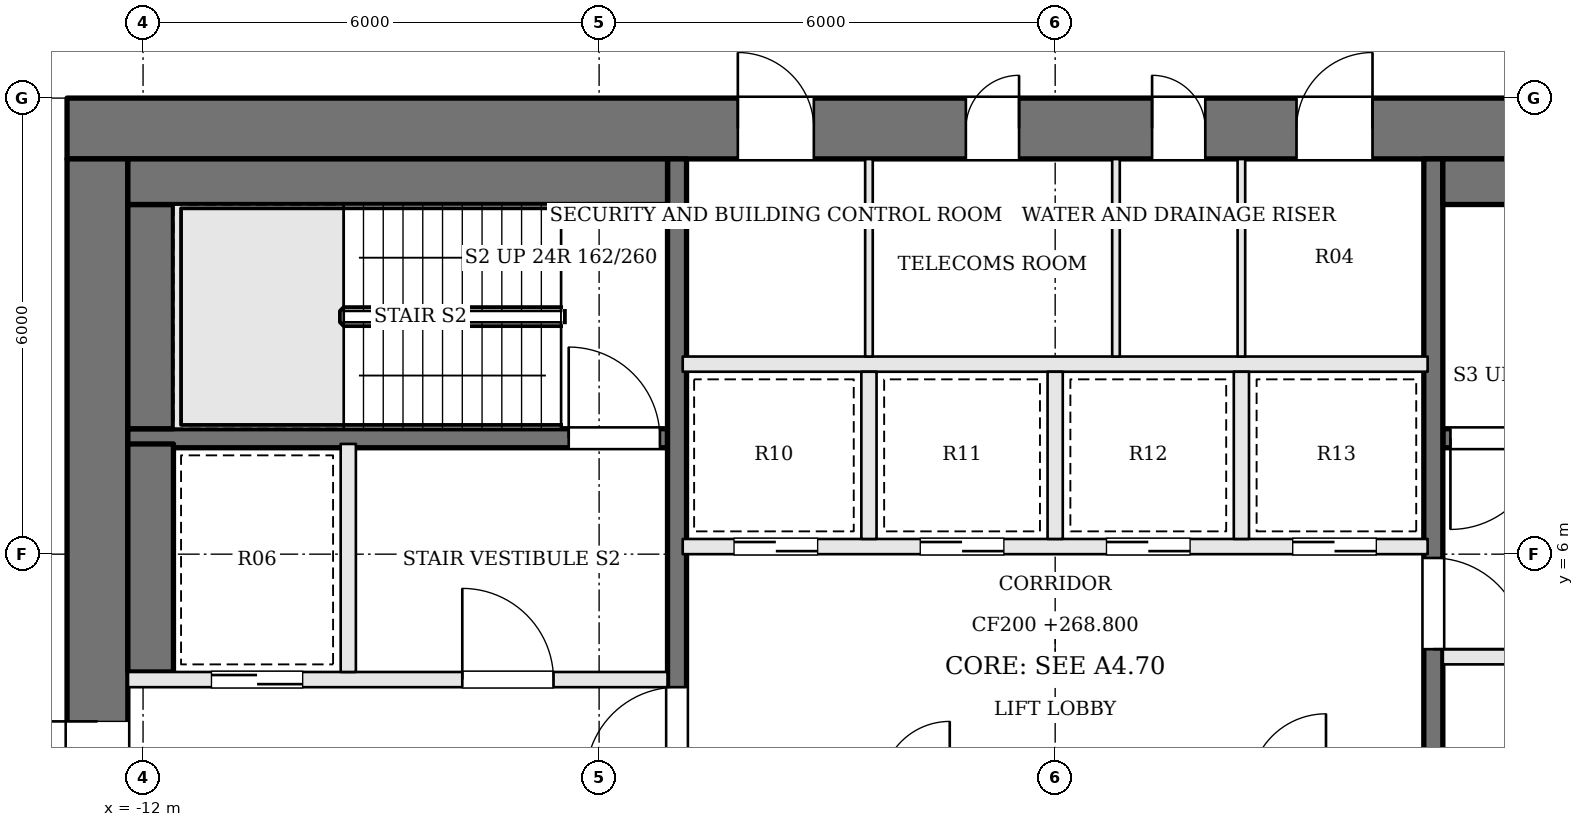
"""IFC4 building model, lengths in metres.
Left out: names, types, materials, properties, quantities, classifications, styles, units other than length and angle.
Written with IfcOpenShell. Run it as: python <this file> out.ifc"""

import sys

from ifc_helpers import new_model, si_unit, direction, frame, frame_2d, origin, place, context, subcontext, project, spatial, rectangle, extrude, element, fill, save


model = new_model("IFC4")
c1 = context("Model", 3, precision=1e-05, world=origin(), true_north=direction((0.0, 1.0)))
c2 = subcontext(c1, "Body", "Model", "MODEL_VIEW")
j1 = project(units=[si_unit("LENGTHUNIT", "METRE"), si_unit("PLANEANGLEUNIT", "RADIAN")], contexts=[c1])
p1 = place(None, origin())
s1 = spatial("IfcSite", under=j1, at=p1, CompositionType="ELEMENT")
p2 = place(p1, origin())
s2 = spatial("IfcBuilding", under=s1, at=p2, CompositionType="ELEMENT")
p3 = place(p2, frame((0.0, 0.0, 268.8)))
s3 = spatial("IfcBuildingStorey", under=s2, at=p3, CompositionType="ELEMENT", Elevation=268.8)
p4 = place(p3, frame((-13.0, 11.6, 0.0), z_axis=(0.0, 0.0, 1.0), x_axis=(1.0, 0.0, 0.0)))
e1 = element("IfcWall", 1, at=p4, inside=s3, PredefinedType="SHEAR", context=c2, shape_type="SweptSolid", body=[
    extrude(rectangle(XDim=26.0, YDim=0.8, at=frame_2d((13.0, 0.0))), origin(), (0.0, 0.0, 1.0), 3.9),
])
p5 = place(p4, frame((8.825, 0.0, 0.0)))
e2 = element("IfcOpeningElement", 2, at=p5, cuts=e1, PredefinedType="OPENING", context=c2, shape_type="SweptSolid", body=[
    extrude(rectangle(XDim=1.0, YDim=2.1, at=frame_2d((0.5, 1.05))), frame((0.0, 0.41, 0.0), z_axis=(0.0, -1.0, 0.0), x_axis=(1.0, 0.0, 0.0)), (0.0, 0.0, 1.0), 0.82),
])
p6 = place(p4, frame((11.825, 0.0, 0.0)))
e3 = element("IfcOpeningElement", 3, at=p6, cuts=e1, PredefinedType="OPENING", context=c2, shape_type="SweptSolid", body=[
    extrude(rectangle(XDim=0.7, YDim=2.1, at=frame_2d((0.35, 1.05))), frame((0.0, 0.41, 0.0), z_axis=(0.0, -1.0, 0.0), x_axis=(1.0, 0.0, 0.0)), (0.0, 0.0, 1.0), 0.82),
])
p7 = place(p4, frame((14.275, 0.0, 0.0)))
e4 = element("IfcOpeningElement", 4, at=p7, cuts=e1, PredefinedType="OPENING", context=c2, shape_type="SweptSolid", body=[
    extrude(rectangle(XDim=0.7, YDim=2.1, at=frame_2d((0.35, 1.05))), frame((0.0, 0.41, 0.0), z_axis=(0.0, -1.0, 0.0), x_axis=(1.0, 0.0, 0.0)), (0.0, 0.0, 1.0), 0.82),
])
p8 = place(p4, frame((16.175, 0.0, 0.0)))
e5 = element("IfcOpeningElement", 5, at=p8, cuts=e1, PredefinedType="OPENING", context=c2, shape_type="SweptSolid", body=[
    extrude(rectangle(XDim=1.0, YDim=2.1, at=frame_2d((0.5, 1.05))), frame((0.0, 0.41, 0.0), z_axis=(0.0, -1.0, 0.0), x_axis=(1.0, 0.0, 0.0)), (0.0, 0.0, 1.0), 0.82),
])
p9 = place(p3, frame((-12.6, -2.2, 0.0), z_axis=(0.0, 0.0, 1.0), x_axis=(0.0, 1.0, 0.0)))
e6 = element("IfcWall", 6, at=p9, inside=s3, PredefinedType="SHEAR", context=c2, shape_type="SweptSolid", body=[
    extrude(rectangle(XDim=13.4, YDim=0.8, at=frame_2d((6.7, 0.0))), origin(), (0.0, 0.0, 1.0), 3.9),
])
p10 = place(p9, frame((4.2, 0.0, 0.0)))
e7 = element("IfcOpeningElement", 7, at=p10, cuts=e6, PredefinedType="OPENING", context=c2, shape_type="SweptSolid", body=[
    extrude(rectangle(XDim=1.8, YDim=2.1, at=frame_2d((0.9, 1.05))), frame((0.0, 0.41, 0.0), z_axis=(0.0, -1.0, 0.0), x_axis=(1.0, 0.0, 0.0)), (0.0, 0.0, 1.0), 0.82),
])
p11 = place(p3, frame((12.2, 7.525, 0.0), z_axis=(0.0, 0.0, 1.0), x_axis=(-1.0, 0.0, 0.0)))
e8 = element("IfcWall", 8, at=p11, inside=s3, PredefinedType="SOLIDWALL", context=c2, shape_type="SweptSolid", body=[
    extrude(rectangle(XDim=7.1, YDim=0.25, at=frame_2d((3.55, 0.0))), origin(), (0.0, 0.0, 1.0), 3.7),
])
p12 = place(p11, frame((5.8, 0.0, 0.0)))
e9 = element("IfcOpeningElement", 9, at=p12, cuts=e8, PredefinedType="OPENING", context=c2, shape_type="SweptSolid", body=[
    extrude(rectangle(XDim=1.2, YDim=2.1, at=frame_2d((0.6, 1.05))), frame((0.0, 0.135, 0.0), z_axis=(0.0, -1.0, 0.0), x_axis=(1.0, 0.0, 0.0)), (0.0, 0.0, 1.0), 0.27),
])
p13 = place(p3, frame((-12.2, 4.35, 0.0), z_axis=(0.0, 0.0, 1.0), x_axis=(1.0, 0.0, 0.0)))
e10 = element("IfcWall", 10, at=p13, inside=s3, PredefinedType="SOLIDWALL", context=c2, shape_type="SweptSolid", body=[
    extrude(rectangle(XDim=7.1, YDim=0.2, at=frame_2d((3.55, 0.0))), origin(), (0.0, 0.0, 1.0), 3.7),
])
p14 = place(p13, frame((4.4, 0.0, 0.0)))
e11 = element("IfcOpeningElement", 11, at=p14, cuts=e10, PredefinedType="OPENING", context=c2, shape_type="SweptSolid", body=[
    extrude(rectangle(XDim=1.2, YDim=2.1, at=frame_2d((0.6, 1.05))), frame((0.0, 0.11, 0.0), z_axis=(0.0, -1.0, 0.0), x_axis=(1.0, 0.0, 0.0)), (0.0, 0.0, 1.0), 0.22),
])
p15 = place(p13, frame((1.1, 0.0, 0.0)))
e12 = element("IfcOpeningElement", 12, at=p15, cuts=e10, PredefinedType="OPENING", context=c2, shape_type="SweptSolid", body=[
    extrude(rectangle(XDim=1.2, YDim=2.1, at=frame_2d((0.6, 1.05))), frame((0.0, 0.11, 0.0), z_axis=(0.0, -1.0, 0.0), x_axis=(1.0, 0.0, 0.0)), (0.0, 0.0, 1.0), 0.22),
])
p16 = place(p3, frame((12.2, 4.65, 0.0), z_axis=(0.0, 0.0, 1.0), x_axis=(-1.0, 0.0, 0.0)))
e13 = element("IfcWall", 13, at=p16, inside=s3, PredefinedType="SOLIDWALL", context=c2, shape_type="SweptSolid", body=[
    extrude(rectangle(XDim=7.1, YDim=0.2, at=frame_2d((3.55, 0.0))), origin(), (0.0, 0.0, 1.0), 3.7),
])
p17 = place(p16, frame((4.4, 0.0, 0.0)))
e14 = element("IfcOpeningElement", 14, at=p17, cuts=e13, PredefinedType="OPENING", context=c2, shape_type="SweptSolid", body=[
    extrude(rectangle(XDim=1.2, YDim=2.1, at=frame_2d((0.6, 1.05))), frame((0.0, 0.11, 0.0), z_axis=(0.0, -1.0, 0.0), x_axis=(1.0, 0.0, 0.0)), (0.0, 0.0, 1.0), 0.22),
])
p18 = place(p16, frame((1.1, 0.0, 0.0)))
e15 = element("IfcOpeningElement", 15, at=p18, cuts=e13, PredefinedType="OPENING", context=c2, shape_type="SweptSolid", body=[
    extrude(rectangle(XDim=1.2, YDim=2.1, at=frame_2d((0.6, 1.05))), frame((0.0, 0.11, 0.0), z_axis=(0.0, -1.0, 0.0), x_axis=(1.0, 0.0, 0.0)), (0.0, 0.0, 1.0), 0.22),
])
p19 = place(p3, frame((-12.2, 7.525, 0.0), z_axis=(0.0, 0.0, 1.0), x_axis=(1.0, 0.0, 0.0)))
e16 = element("IfcWall", 16, at=p19, inside=s3, PredefinedType="SOLIDWALL", context=c2, shape_type="SweptSolid", body=[
    extrude(rectangle(XDim=7.1, YDim=0.25, at=frame_2d((3.55, 0.0))), origin(), (0.0, 0.0, 1.0), 3.7),
])
p20 = place(p19, frame((5.8, 0.0, 0.0)))
e17 = element("IfcOpeningElement", 17, at=p20, cuts=e16, PredefinedType="OPENING", context=c2, shape_type="SweptSolid", body=[
    extrude(rectangle(XDim=1.2, YDim=2.1, at=frame_2d((0.6, 1.05))), frame((0.0, 0.135, 0.0), z_axis=(0.0, -1.0, 0.0), x_axis=(1.0, 0.0, 0.0)), (0.0, 0.0, 1.0), 0.27),
])
p21 = place(p3, frame((-9.3, 4.45, 0.0), z_axis=(0.0, 0.0, 1.0), x_axis=(0.0, 1.0, 0.0)))
e18 = element("IfcWall", 18, at=p21, inside=s3, PredefinedType="SOLIDWALL", context=c2, shape_type="SweptSolid", body=[
    extrude(rectangle(XDim=3.0, YDim=0.2, at=frame_2d((1.5, 0.0))), origin(), (0.0, 0.0, 1.0), 3.7),
])
p22 = place(p3, frame((-4.975, -2.2, 0.0), z_axis=(0.0, 0.0, 1.0), x_axis=(0.0, 1.0, 0.0)))
e19 = element("IfcWall", 19, at=p22, inside=s3, PredefinedType="SOLIDWALL", context=c2, shape_type="SweptSolid", body=[
    extrude(rectangle(XDim=13.4, YDim=0.25, at=frame_2d((6.7, 0.0))), origin(), (0.0, 0.0, 1.0), 3.7),
])
p23 = place(p22, frame((5.25, 0.0, 0.0)))
e20 = element("IfcOpeningElement", 20, at=p23, cuts=e19, PredefinedType="OPENING", context=c2, shape_type="SweptSolid", body=[
    extrude(rectangle(XDim=1.2, YDim=2.1, at=frame_2d((0.6, 1.05))), frame((0.0, 0.135, 0.0), z_axis=(0.0, -1.0, 0.0), x_axis=(1.0, 0.0, 0.0)), (0.0, 0.0, 1.0), 0.27),
])
p24 = place(p3, frame((4.975, 11.2, 0.0), z_axis=(0.0, 0.0, 1.0), x_axis=(0.0, -1.0, 0.0)))
e21 = element("IfcWall", 21, at=p24, inside=s3, PredefinedType="SOLIDWALL", context=c2, shape_type="SweptSolid", body=[
    extrude(rectangle(XDim=13.4, YDim=0.25, at=frame_2d((6.7, 0.0))), origin(), (0.0, 0.0, 1.0), 3.7),
])
p25 = place(p24, frame((5.25, 0.0, 0.0)))
e22 = element("IfcOpeningElement", 22, at=p25, cuts=e21, PredefinedType="OPENING", context=c2, shape_type="SweptSolid", body=[
    extrude(rectangle(XDim=1.2, YDim=2.1, at=frame_2d((0.6, 1.05))), frame((0.0, 0.135, 0.0), z_axis=(0.0, -1.0, 0.0), x_axis=(1.0, 0.0, 0.0)), (0.0, 0.0, 1.0), 0.27),
])
p26 = place(p3, frame((-11.9, 4.45, 0.0), z_axis=(0.0, 0.0, 1.0), x_axis=(0.0, 1.0, 0.0)))
e23 = element("IfcWall", 23, at=p26, inside=s3, PredefinedType="SOLIDWALL", context=c2, shape_type="SweptSolid", body=[
    extrude(rectangle(XDim=3.0, YDim=0.6, at=frame_2d((1.5, 0.0))), origin(), (0.0, 0.0, 1.0), 3.7),
])
p27 = place(p3, frame((-11.9, 7.65, 0.0), z_axis=(0.0, 0.0, 1.0), x_axis=(0.0, 1.0, 0.0)))
e24 = element("IfcWall", 24, at=p27, inside=s3, PredefinedType="SOLIDWALL", context=c2, shape_type="SweptSolid", body=[
    extrude(rectangle(XDim=2.95, YDim=0.6, at=frame_2d((1.475, 0.0))), origin(), (0.0, 0.0, 1.0), 3.7),
])
for number, where, z_axis, x_axis in (
    (25, (-12.2, 10.9, 0.0), (0.0, 0.0, 1.0), (1.0, 0.0, 0.0)),
    (26, (12.2, 10.9, 0.0), (0.0, 0.0, 1.0), (-1.0, 0.0, 0.0)),
):
    element("IfcWall", number, at=place(p3, frame(where, z_axis=z_axis, x_axis=x_axis)), inside=s3, PredefinedType="SOLIDWALL", context=c2, shape_type="SweptSolid", body=[
        extrude(rectangle(XDim=7.1, YDim=0.6, at=frame_2d((3.55, 0.0))), origin(), (0.0, 0.0, 1.0), 3.7),
    ])
p28 = place(p3, frame((-4.9, 6.1, 0.0), z_axis=(0.0, 0.0, 1.0), x_axis=(1.0, 0.0, 0.0)))
e27 = element("IfcWall", 27, at=p28, inside=s3, PredefinedType="SOLIDWALL", context=c2, shape_type="SweptSolid", body=[
    extrude(rectangle(XDim=9.8, YDim=0.2, at=frame_2d((4.9, 0.0))), origin(), (0.0, 0.0, 1.0), 3.7),
])
p29 = place(p28, frame((0.675, 0.0, 0.0)))
e28 = element("IfcOpeningElement", 28, at=p29, cuts=e27, PredefinedType="OPENING", context=c2, shape_type="SweptSolid", body=[
    extrude(rectangle(XDim=1.1, YDim=2.1, at=frame_2d((0.55, 1.05))), frame((0.0, 0.11, 0.0), z_axis=(0.0, -1.0, 0.0), x_axis=(1.0, 0.0, 0.0)), (0.0, 0.0, 1.0), 0.22),
])
p30 = place(p28, frame((3.125, 0.0, 0.0)))
e29 = element("IfcOpeningElement", 29, at=p30, cuts=e27, PredefinedType="OPENING", context=c2, shape_type="SweptSolid", body=[
    extrude(rectangle(XDim=1.1, YDim=2.1, at=frame_2d((0.55, 1.05))), frame((0.0, 0.11, 0.0), z_axis=(0.0, -1.0, 0.0), x_axis=(1.0, 0.0, 0.0)), (0.0, 0.0, 1.0), 0.22),
])
p31 = place(p28, frame((5.575, 0.0, 0.0)))
e30 = element("IfcOpeningElement", 30, at=p31, cuts=e27, PredefinedType="OPENING", context=c2, shape_type="SweptSolid", body=[
    extrude(rectangle(XDim=1.1, YDim=2.1, at=frame_2d((0.55, 1.05))), frame((0.0, 0.11, 0.0), z_axis=(0.0, -1.0, 0.0), x_axis=(1.0, 0.0, 0.0)), (0.0, 0.0, 1.0), 0.22),
])
p32 = place(p28, frame((8.025, 0.0, 0.0)))
e31 = element("IfcOpeningElement", 31, at=p32, cuts=e27, PredefinedType="OPENING", context=c2, shape_type="SweptSolid", body=[
    extrude(rectangle(XDim=1.1, YDim=2.1, at=frame_2d((0.55, 1.05))), frame((0.0, 0.11, 0.0), z_axis=(0.0, -1.0, 0.0), x_axis=(1.0, 0.0, 0.0)), (0.0, 0.0, 1.0), 0.22),
])
p33 = place(p3, frame((-4.9, 8.5, 0.0), z_axis=(0.0, 0.0, 1.0), x_axis=(1.0, 0.0, 0.0)))
e32 = element("IfcWall", 32, at=p33, inside=s3, PredefinedType="SOLIDWALL", context=c2, shape_type="SweptSolid", body=[
    extrude(rectangle(XDim=9.8, YDim=0.2, at=frame_2d((4.9, 0.0))), origin(), (0.0, 0.0, 1.0), 3.7),
])
for number, where, z_axis, x_axis in (
    (33, (-2.45, 6.2, 0.0), (0.0, 0.0, 1.0), (0.0, 1.0, 0.0)),
    (34, (0.0, 6.2, 0.0), (0.0, 0.0, 1.0), (0.0, 1.0, 0.0)),
    (35, (2.45, 6.2, 0.0), (0.0, 0.0, 1.0), (0.0, 1.0, 0.0)),
):
    element("IfcWall", number, at=place(p3, frame(where, z_axis=z_axis, x_axis=x_axis)), inside=s3, PredefinedType="SOLIDWALL", context=c2, shape_type="SweptSolid", body=[
        extrude(rectangle(XDim=2.2, YDim=0.2, at=frame_2d((1.1, 0.0))), origin(), (0.0, 0.0, 1.0), 3.7),
    ])
for number, where, z_axis, x_axis in (
    (36, (-2.45, 8.6, 0.0), (0.0, 0.0, 1.0), (0.0, 1.0, 0.0)),
    (37, (0.8, 8.6, 0.0), (0.0, 0.0, 1.0), (0.0, 1.0, 0.0)),
    (38, (2.45, 8.6, 0.0), (0.0, 0.0, 1.0), (0.0, 1.0, 0.0)),
):
    element("IfcWall", number, at=place(p3, frame(where, z_axis=z_axis, x_axis=x_axis)), inside=s3, PredefinedType="PARTITIONING", context=c2, shape_type="SweptSolid", body=[
        extrude(rectangle(XDim=2.6, YDim=0.1, at=frame_2d((1.3, 0.0))), origin(), (0.0, 0.0, 1.0), 3.7),
    ])
p34 = place(p10, origin())
e39 = element("IfcDoor", 39, at=p34, inside=s3, OperationType="DOUBLE_DOOR_SINGLE_SWING", PredefinedType="DOOR", context=c2, shape_type="SweptSolid", body=[
    extrude(rectangle(XDim=1.8, YDim=2.1, at=frame_2d((0.9, 1.05))), frame((0.0, 0.025, 0.0), z_axis=(0.0, -1.0, 0.0), x_axis=(1.0, 0.0, 0.0)), (0.0, 0.0, 1.0), 0.05),
])
fill(e7, e39)
p35 = place(p23, origin())
e40 = element("IfcDoor", 40, at=p35, inside=s3, OperationType="SINGLE_SWING_LEFT", PredefinedType="DOOR", context=c2, shape_type="SweptSolid", body=[
    extrude(rectangle(XDim=1.2, YDim=2.1, at=frame_2d((0.6, 1.05))), frame((0.0, 0.025, 0.0), z_axis=(0.0, -1.0, 0.0), x_axis=(1.0, 0.0, 0.0)), (0.0, 0.0, 1.0), 0.05),
])
fill(e20, e40)
p36 = place(p25, origin())
e41 = element("IfcDoor", 41, at=p36, inside=s3, OperationType="SINGLE_SWING_RIGHT", PredefinedType="DOOR", context=c2, shape_type="SweptSolid", body=[
    extrude(rectangle(XDim=1.2, YDim=2.1, at=frame_2d((0.6, 1.05))), frame((0.0, 0.025, 0.0), z_axis=(0.0, -1.0, 0.0), x_axis=(1.0, 0.0, 0.0)), (0.0, 0.0, 1.0), 0.05),
])
fill(e22, e41)
p37 = place(p14, origin())
e42 = element("IfcDoor", 42, at=p37, inside=s3, OperationType="SINGLE_SWING_LEFT", PredefinedType="DOOR", context=c2, shape_type="SweptSolid", body=[
    extrude(rectangle(XDim=1.2, YDim=2.1, at=frame_2d((0.6, 1.05))), frame((0.0, 0.025, 0.0), z_axis=(0.0, -1.0, 0.0), x_axis=(1.0, 0.0, 0.0)), (0.0, 0.0, 1.0), 0.05),
])
fill(e11, e42)
p38 = place(p12, origin())
e43 = element("IfcDoor", 43, at=p38, inside=s3, OperationType="SINGLE_SWING_RIGHT", PredefinedType="DOOR", context=c2, shape_type="SweptSolid", body=[
    extrude(rectangle(XDim=1.2, YDim=2.1, at=frame_2d((0.6, 1.05))), frame((0.0, 0.025, 0.0), z_axis=(0.0, -1.0, 0.0), x_axis=(1.0, 0.0, 0.0)), (0.0, 0.0, 1.0), 0.05),
])
fill(e9, e43)
p39 = place(p20, origin())
e44 = element("IfcDoor", 44, at=p39, inside=s3, OperationType="SINGLE_SWING_LEFT", PredefinedType="DOOR", context=c2, shape_type="SweptSolid", body=[
    extrude(rectangle(XDim=1.2, YDim=2.1, at=frame_2d((0.6, 1.05))), frame((0.0, 0.025, 0.0), z_axis=(0.0, -1.0, 0.0), x_axis=(1.0, 0.0, 0.0)), (0.0, 0.0, 1.0), 0.05),
])
fill(e17, e44)
p40 = place(p15, origin())
e45 = element("IfcDoor", 45, at=p40, inside=s3, OperationType="SLIDING_TO_RIGHT", PredefinedType="DOOR", context=c2, shape_type="SweptSolid", body=[
    extrude(rectangle(XDim=1.2, YDim=2.1, at=frame_2d((0.6, 1.05))), frame((0.0, 0.025, 0.0), z_axis=(0.0, -1.0, 0.0), x_axis=(1.0, 0.0, 0.0)), (0.0, 0.0, 1.0), 0.05),
])
fill(e12, e45)
p41 = place(p29, origin())
e46 = element("IfcDoor", 46, at=p41, inside=s3, OperationType="SLIDING_TO_RIGHT", PredefinedType="DOOR", context=c2, shape_type="SweptSolid", body=[
    extrude(rectangle(XDim=1.1, YDim=2.1, at=frame_2d((0.55, 1.05))), frame((0.0, 0.025, 0.0), z_axis=(0.0, -1.0, 0.0), x_axis=(1.0, 0.0, 0.0)), (0.0, 0.0, 1.0), 0.05),
])
fill(e28, e46)
p42 = place(p30, origin())
e47 = element("IfcDoor", 47, at=p42, inside=s3, OperationType="SLIDING_TO_LEFT", PredefinedType="DOOR", context=c2, shape_type="SweptSolid", body=[
    extrude(rectangle(XDim=1.1, YDim=2.1, at=frame_2d((0.55, 1.05))), frame((0.0, 0.025, 0.0), z_axis=(0.0, -1.0, 0.0), x_axis=(1.0, 0.0, 0.0)), (0.0, 0.0, 1.0), 0.05),
])
fill(e29, e47)
p43 = place(p31, origin())
e48 = element("IfcDoor", 48, at=p43, inside=s3, OperationType="SLIDING_TO_RIGHT", PredefinedType="DOOR", context=c2, shape_type="SweptSolid", body=[
    extrude(rectangle(XDim=1.1, YDim=2.1, at=frame_2d((0.55, 1.05))), frame((0.0, 0.025, 0.0), z_axis=(0.0, -1.0, 0.0), x_axis=(1.0, 0.0, 0.0)), (0.0, 0.0, 1.0), 0.05),
])
fill(e30, e48)
p44 = place(p32, origin())
e49 = element("IfcDoor", 49, at=p44, inside=s3, OperationType="SLIDING_TO_LEFT", PredefinedType="DOOR", context=c2, shape_type="SweptSolid", body=[
    extrude(rectangle(XDim=1.1, YDim=2.1, at=frame_2d((0.55, 1.05))), frame((0.0, 0.025, 0.0), z_axis=(0.0, -1.0, 0.0), x_axis=(1.0, 0.0, 0.0)), (0.0, 0.0, 1.0), 0.05),
])
fill(e31, e49)
p45 = place(p5, origin())
e50 = element("IfcDoor", 50, at=p45, inside=s3, OperationType="SINGLE_SWING_LEFT", PredefinedType="DOOR", context=c2, shape_type="SweptSolid", body=[
    extrude(rectangle(XDim=1.0, YDim=2.1, at=frame_2d((0.5, 1.05))), frame((0.0, 0.025, 0.0), z_axis=(0.0, -1.0, 0.0), x_axis=(1.0, 0.0, 0.0)), (0.0, 0.0, 1.0), 0.05),
])
fill(e2, e50)
p46 = place(p6, origin())
e51 = element("IfcDoor", 51, at=p46, inside=s3, OperationType="SINGLE_SWING_RIGHT", PredefinedType="DOOR", context=c2, shape_type="SweptSolid", body=[
    extrude(rectangle(XDim=0.7, YDim=2.1, at=frame_2d((0.35, 1.05))), frame((0.0, 0.025, 0.0), z_axis=(0.0, -1.0, 0.0), x_axis=(1.0, 0.0, 0.0)), (0.0, 0.0, 1.0), 0.05),
])
fill(e3, e51)
p47 = place(p7, origin())
e52 = element("IfcDoor", 52, at=p47, inside=s3, OperationType="SINGLE_SWING_LEFT", PredefinedType="DOOR", context=c2, shape_type="SweptSolid", body=[
    extrude(rectangle(XDim=0.7, YDim=2.1, at=frame_2d((0.35, 1.05))), frame((0.0, 0.025, 0.0), z_axis=(0.0, -1.0, 0.0), x_axis=(1.0, 0.0, 0.0)), (0.0, 0.0, 1.0), 0.05),
])
fill(e4, e52)
p48 = place(p8, origin())
e53 = element("IfcDoor", 53, at=p48, inside=s3, OperationType="SINGLE_SWING_RIGHT", PredefinedType="DOOR", context=c2, shape_type="SweptSolid", body=[
    extrude(rectangle(XDim=1.0, YDim=2.1, at=frame_2d((0.5, 1.05))), frame((0.0, 0.025, 0.0), z_axis=(0.0, -1.0, 0.0), x_axis=(1.0, 0.0, 0.0)), (0.0, 0.0, 1.0), 0.05),
])
fill(e5, e53)
save(model, sys.argv[1])
